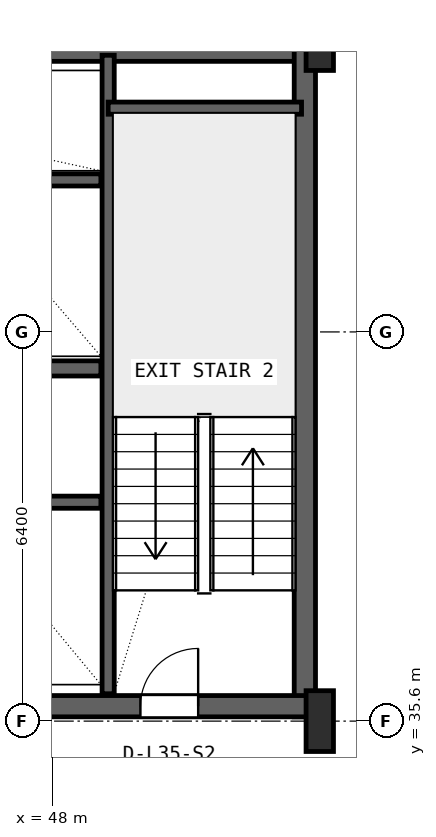
"""IFC4 building model, lengths in metres.
Left out: names, types, materials, properties, quantities, classifications, styles, units other than length and angle.
Written with IfcOpenShell. Run it as: python <this file> out.ifc"""

import sys

from ifc_helpers import new_model, si_unit, direction, frame, frame_2d, origin, origin_2d, place, context, subcontext, project, spatial, rectangle, i_section, extrude, source, transform, mapped, element, fill, save


model = new_model("IFC4")
c1 = context("Model", 3, precision=1e-05, world=origin(), true_north=direction((0.0, 1.0)))
c2 = subcontext(c1, "Body", "Model", "MODEL_VIEW")
j1 = project(units=[si_unit("LENGTHUNIT", "METRE"), si_unit("PLANEANGLEUNIT", "RADIAN")], contexts=[c1])
p1 = place(None, origin())
s1 = spatial("IfcSite", under=j1, at=p1, CompositionType="ELEMENT")
p2 = place(p1, origin())
s2 = spatial("IfcBuilding", under=s1, at=p2, CompositionType="ELEMENT")
p3 = place(p2, frame((0.0, 0.0, 145.8)))
s3 = spatial("IfcBuildingStorey", under=s2, at=p3, CompositionType="ELEMENT", Elevation=145.8)
p4 = place(p3, frame((15.6, 46.625, 0.0), z_axis=(0.0, 0.0, 1.0), x_axis=(1.0, 0.0, 0.0)))
e1 = element("IfcWall", 1, at=p4, inside=s3, PredefinedType="SHEAR", context=c2, shape_type="SweptSolid", body=[
    extrude(rectangle(XDim=36.8, YDim=0.35, at=frame_2d((18.4, 0.0))), origin(), (0.0, 0.0, 1.0), 3.55),
])
p5 = place(p3, frame((52.155, 35.67, 0.0), z_axis=(0.0, 0.0, 1.0), x_axis=(0.0, 1.0, 0.0)))
e2 = element("IfcWall", 2, at=p5, inside=s3, PredefinedType="SHEAR", context=c2, shape_type="SweptSolid", body=[
    extrude(rectangle(XDim=11.13, YDim=0.35, at=frame_2d((5.565, 0.0))), origin(), (0.0, 0.0, 1.0), 3.55),
])
p6 = place(p3, frame((43.2, 35.845, 0.0), z_axis=(0.0, 0.0, 1.0), x_axis=(1.0, 0.0, 0.0)))
e3 = element("IfcWall", 3, at=p6, inside=s3, PredefinedType="SHEAR", context=c2, shape_type="SweptSolid", body=[
    extrude(rectangle(XDim=9.13, YDim=0.35, at=frame_2d((4.565, 0.0))), origin(), (0.0, 0.0, 1.0), 3.55),
])
p7 = place(p6, frame((6.25, 0.0, 0.0)))
e4 = element("IfcOpeningElement", 4, at=p7, cuts=e3, PredefinedType="OPENING", context=c2, shape_type="SweptSolid", body=[
    extrude(rectangle(XDim=0.95, YDim=2.1, at=frame_2d((0.475, 1.05))), frame((0.0, 0.185, 0.0), z_axis=(0.0, -1.0, 0.0), x_axis=(1.0, 0.0, 0.0)), (0.0, 0.0, 1.0), 0.37),
])
m1 = source(origin(), c2, "Body", "SweptSolid", [
    extrude(i_section(OverallWidth=0.45, OverallDepth=1.0, WebThickness=0.016, FlangeThickness=0.03, FilletRadius=0.016, at=origin_2d()), origin(), (0.0, 0.0, 1.0), 3.8),
])
for number, where, z_axis, x_axis in (
    (5, (52.4, 35.6, 0.0), (0.0, 0.0, 1.0), (1.0, 0.0, 0.0)),
    (6, (52.4, 46.8, 0.0), (0.0, 0.0, 1.0), (1.0, 0.0, 0.0)),
):
    element("IfcColumn", number, at=place(p3, frame(where, z_axis=z_axis, x_axis=x_axis)), inside=s3, PredefinedType="COLUMN", context=c2, shape_type="MappedRepresentation", body=[
        mapped(m1, transform((0.0, 0.0, 0.0), x_axis=(1.0, 0.0, 0.0), y_axis=(0.0, 1.0, 0.0), z_axis=(0.0, 0.0, 1.0), scale=1.0)),
    ])
p8 = place(p3, frame((48.92, 36.05, 0.0), z_axis=(0.0, 0.0, 1.0), x_axis=(0.0, 1.0, 0.0)))
e7 = element("IfcWall", 7, at=p8, inside=s3, PredefinedType="SHEAR", context=c2, shape_type="SweptSolid", body=[
    extrude(rectangle(XDim=10.5, YDim=0.2, at=frame_2d((5.25, 0.0))), origin(), (0.0, 0.0, 1.0), 3.55),
])
p9 = place(p3, frame((48.92, 45.68, 0.0), z_axis=(0.0, 0.0, 1.0), x_axis=(1.0, 0.0, 0.0)))
e8 = element("IfcWall", 8, at=p9, inside=s3, PredefinedType="SHEAR", context=c2, shape_type="SweptSolid", body=[
    extrude(rectangle(XDim=3.18, YDim=0.2, at=frame_2d((1.59, 0.0))), origin(), (0.0, 0.0, 1.0), 3.55),
])
p10 = place(p3, frame((24.98, 41.4, 0.0), z_axis=(0.0, 0.0, 1.0), x_axis=(1.0, 0.0, 0.0)))
e9 = element("IfcWall", 9, at=p10, inside=s3, PredefinedType="SHEAR", context=c2, shape_type="SweptSolid", body=[
    extrude(rectangle(XDim=23.82, YDim=0.25, at=frame_2d((11.91, 0.0))), origin(), (0.0, 0.0, 1.0), 3.55),
])
p11 = place(p10, frame((8.87, 0.0, 0.0)))
e10 = element("IfcOpeningElement", 10, at=p11, cuts=e9, PredefinedType="OPENING", context=c2, shape_type="SweptSolid", body=[
    extrude(rectangle(XDim=1.1, YDim=2.18, at=frame_2d((0.55, 1.09))), frame((0.0, 0.135, 0.0), z_axis=(0.0, -1.0, 0.0), x_axis=(1.0, 0.0, 0.0)), (0.0, 0.0, 1.0), 0.27),
])
p12 = place(p10, frame((11.47, 0.0, 0.0)))
e11 = element("IfcOpeningElement", 11, at=p12, cuts=e9, PredefinedType="OPENING", context=c2, shape_type="SweptSolid", body=[
    extrude(rectangle(XDim=1.1, YDim=2.18, at=frame_2d((0.55, 1.09))), frame((0.0, 0.135, 0.0), z_axis=(0.0, -1.0, 0.0), x_axis=(1.0, 0.0, 0.0)), (0.0, 0.0, 1.0), 0.27),
])
p13 = place(p10, frame((14.07, 0.0, 0.0)))
e12 = element("IfcOpeningElement", 12, at=p13, cuts=e9, PredefinedType="OPENING", context=c2, shape_type="SweptSolid", body=[
    extrude(rectangle(XDim=1.1, YDim=2.18, at=frame_2d((0.55, 1.09))), frame((0.0, 0.135, 0.0), z_axis=(0.0, -1.0, 0.0), x_axis=(1.0, 0.0, 0.0)), (0.0, 0.0, 1.0), 0.27),
])
p14 = place(p10, frame((0.96, 0.0, 0.0)))
e13 = element("IfcOpeningElement", 13, at=p14, cuts=e9, PredefinedType="OPENING", context=c2, shape_type="SweptSolid", body=[
    extrude(rectangle(XDim=1.0, YDim=2.08, at=frame_2d((0.5, 1.04))), frame((0.0, 0.135, 0.0), z_axis=(0.0, -1.0, 0.0), x_axis=(1.0, 0.0, 0.0)), (0.0, 0.0, 1.0), 0.27),
])
p15 = place(p10, frame((3.56, 0.0, 0.0)))
e14 = element("IfcOpeningElement", 14, at=p15, cuts=e9, PredefinedType="OPENING", context=c2, shape_type="SweptSolid", body=[
    extrude(rectangle(XDim=1.0, YDim=2.08, at=frame_2d((0.5, 1.04))), frame((0.0, 0.135, 0.0), z_axis=(0.0, -1.0, 0.0), x_axis=(1.0, 0.0, 0.0)), (0.0, 0.0, 1.0), 0.27),
])
p16 = place(p10, frame((6.16, 0.0, 0.0)))
e15 = element("IfcOpeningElement", 15, at=p16, cuts=e9, PredefinedType="OPENING", context=c2, shape_type="SweptSolid", body=[
    extrude(rectangle(XDim=0.92, YDim=2.08, at=frame_2d((0.46, 1.04))), frame((0.0, 0.135, 0.0), z_axis=(0.0, -1.0, 0.0), x_axis=(1.0, 0.0, 0.0)), (0.0, 0.0, 1.0), 0.27),
])
p17 = place(p3, frame((41.22, 44.5, 0.0), z_axis=(0.0, 0.0, 1.0), x_axis=(1.0, 0.0, 0.0)))
e16 = element("IfcWall", 16, at=p17, inside=s3, PredefinedType="SHEAR", context=c2, shape_type="SweptSolid", body=[
    extrude(rectangle(XDim=7.58, YDim=0.2, at=frame_2d((3.79, 0.0))), origin(), (0.0, 0.0, 1.0), 3.55),
])
p18 = place(p3, frame((43.65, 39.2, 0.0), z_axis=(0.0, 0.0, 1.0), x_axis=(1.0, 0.0, 0.0)))
e17 = element("IfcWall", 17, at=p18, inside=s3, PredefinedType="SHEAR", context=c2, shape_type="SweptSolid", body=[
    extrude(rectangle(XDim=5.15, YDim=0.2, at=frame_2d((2.575, 0.0))), origin(), (0.0, 0.0, 1.0), 3.55),
])
m2 = source(origin(), c2, "Body", "SweptSolid", [
    extrude(rectangle(XDim=0.95, YDim=2.1, at=frame_2d((0.475, 1.05))), frame((0.0, 0.025, 0.0), z_axis=(0.0, -1.0, 0.0), x_axis=(1.0, 0.0, 0.0)), (0.0, 0.0, 1.0), 0.05),
])
p19 = place(p7, origin())
e18 = element("IfcDoor", 18, at=p19, inside=s3, OperationType="SINGLE_SWING_RIGHT", PredefinedType="DOOR", context=c2, shape_type="MappedRepresentation", body=[
    mapped(m2, transform((0.0, 0.0, 0.0), x_axis=(1.0, 0.0, 0.0), y_axis=(0.0, 1.0, 0.0), z_axis=(0.0, 0.0, 1.0), scale=1.0)),
])
fill(e4, e18)
save(model, sys.argv[1])
